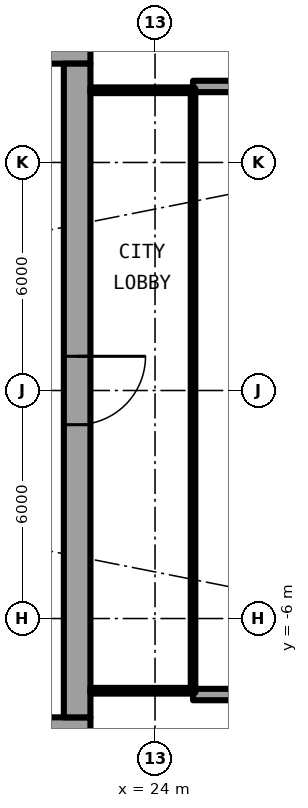
"""IFC4 building model, lengths in metres.
Left out: names, types, materials, properties, quantities, classifications, styles, units other than length and angle.
Written with IfcOpenShell. Run it as: python <this file> out.ifc"""

import sys

from ifc_helpers import new_model, si_unit, direction, frame, frame_2d, origin, place, context, subcontext, project, spatial, rectangle, extrude, element, fill, save


model = new_model("IFC4")
c1 = context("Model", 3, precision=1e-05, world=origin(), true_north=direction((0.0, 1.0)))
c2 = subcontext(c1, "Body", "Model", "MODEL_VIEW")
j1 = project(units=[si_unit("LENGTHUNIT", "METRE"), si_unit("PLANEANGLEUNIT", "RADIAN")], contexts=[c1])
p1 = place(None, origin())
s1 = spatial("IfcSite", under=j1, at=p1, CompositionType="ELEMENT")
p2 = place(p1, origin())
s2 = spatial("IfcBuilding", under=s1, at=p2, CompositionType="ELEMENT")
p3 = place(p2, frame((0.0, 0.0, 91.05)))
s3 = spatial("IfcBuildingStorey", under=s2, at=p3, CompositionType="ELEMENT", Elevation=91.05)
for number, where, z_axis, x_axis in (
    (1, (25.0, 8.0, 0.0), (0.0, 0.0, 1.0), (1.0, 0.0, 0.0)),
    (2, (25.0, -8.0, 0.0), (0.0, 0.0, 1.0), (1.0, 0.0, 0.0)),
):
    element("IfcWall", number, at=place(p3, frame(where, z_axis=z_axis, x_axis=x_axis)), inside=s3, PredefinedType="SOLIDWALL", context=c2, shape_type="SweptSolid", body=[
        extrude(rectangle(XDim=2.667, YDim=0.3, at=frame_2d((1.333, 0.0))), origin(), (0.0, 0.0, 1.0), 2.7),
    ])
p4 = place(p3, frame((22.3, 8.95, 0.0), z_axis=(0.0, 0.0, 1.0), x_axis=(-1.0, 0.0, 0.0)))
e3 = element("IfcWall", 3, at=p4, inside=s3, PredefinedType="SHEAR", context=c2, shape_type="SweptSolid", body=[
    extrude(rectangle(XDim=14.0, YDim=0.7, at=frame_2d((7.0, 0.0))), origin(), (0.0, 0.0, 1.0), 3.05),
])
p5 = place(p4, frame((1.225, 0.0, 0.0)))
e4 = element("IfcOpeningElement", 4, at=p5, cuts=e3, PredefinedType="OPENING", context=c2, shape_type="SweptSolid", body=[
    extrude(rectangle(XDim=1.2, YDim=2.3, at=frame_2d((0.6, 1.15))), frame((0.0, 0.36, 0.0), z_axis=(0.0, -1.0, 0.0), x_axis=(1.0, 0.0, 0.0)), (0.0, 0.0, 1.0), 0.72),
])
p6 = place(p3, frame((8.3, -8.95, 0.0), z_axis=(0.0, 0.0, 1.0), x_axis=(1.0, 0.0, 0.0)))
e5 = element("IfcWall", 5, at=p6, inside=s3, PredefinedType="SHEAR", context=c2, shape_type="SweptSolid", body=[
    extrude(rectangle(XDim=14.0, YDim=0.7, at=frame_2d((7.0, 0.0))), origin(), (0.0, 0.0, 1.0), 3.05),
])
p7 = place(p6, frame((11.575, 0.0, 0.0)))
e6 = element("IfcOpeningElement", 6, at=p7, cuts=e5, PredefinedType="OPENING", context=c2, shape_type="SweptSolid", body=[
    extrude(rectangle(XDim=1.2, YDim=2.3, at=frame_2d((0.6, 1.15))), frame((0.0, 0.36, 0.0), z_axis=(0.0, -1.0, 0.0), x_axis=(1.0, 0.0, 0.0)), (0.0, 0.0, 1.0), 0.72),
])
p8 = place(p3, frame((21.95, 8.6, 0.0), z_axis=(0.0, 0.0, 1.0), x_axis=(0.0, -1.0, 0.0)))
e7 = element("IfcWall", 7, at=p8, inside=s3, PredefinedType="SHEAR", context=c2, shape_type="SweptSolid", body=[
    extrude(rectangle(XDim=17.2, YDim=0.7, at=frame_2d((8.6, 0.0))), origin(), (0.0, 0.0, 1.0), 3.05),
])
p9 = place(p8, frame((7.7, 0.0, 0.0)))
e8 = element("IfcOpeningElement", 8, at=p9, cuts=e7, PredefinedType="OPENING", context=c2, shape_type="SweptSolid", body=[
    extrude(rectangle(XDim=1.8, YDim=2.3, at=frame_2d((0.9, 1.15))), frame((0.0, 0.36, 0.0), z_axis=(0.0, -1.0, 0.0), x_axis=(1.0, 0.0, 0.0)), (0.0, 0.0, 1.0), 0.72),
])
for number, where, z_axis, x_axis in (
    (9, (22.3, -7.9, 0.0), (0.0, 0.0, 1.0), (1.0, 0.0, 0.0)),
    (10, (22.3, 7.9, 0.0), (0.0, 0.0, 1.0), (1.0, 0.0, 0.0)),
):
    element("IfcWall", number, at=place(p3, frame(where, z_axis=z_axis, x_axis=x_axis)), inside=s3, PredefinedType="PARTITIONING", context=c2, shape_type="SweptSolid", body=[
        extrude(rectangle(XDim=2.64, YDim=0.15, at=frame_2d((1.32, 0.0))), origin(), (0.0, 0.0, 1.0), 2.7),
    ])
p10 = place(p3, frame((25.0, -7.95, 0.0), z_axis=(0.0, 0.0, 1.0), x_axis=(0.0, 1.0, 0.0)))
e11 = element("IfcWall", 11, at=p10, inside=s3, PredefinedType="PARTITIONING", context=c2, shape_type="SweptSolid", body=[
    extrude(rectangle(XDim=15.9, YDim=0.12, at=frame_2d((7.95, 0.0))), origin(), (0.0, 0.0, 1.0), 2.7),
])
p11 = place(p10, frame((0.95, 0.0, 0.1)))
e12 = element("IfcOpeningElement", 12, at=p11, cuts=e11, PredefinedType="OPENING", context=c2, shape_type="SweptSolid", body=[
    extrude(rectangle(XDim=14.0, YDim=2.35, at=frame_2d((7.0, 1.175))), frame((0.0, 0.07, 0.0), z_axis=(0.0, -1.0, 0.0), x_axis=(1.0, 0.0, 0.0)), (0.0, 0.0, 1.0), 0.14),
])
p12 = place(p9, origin())
e13 = element("IfcDoor", 13, at=p12, inside=s3, OperationType="SINGLE_SWING_LEFT", PredefinedType="DOOR", context=c2, shape_type="SweptSolid", body=[
    extrude(rectangle(XDim=1.8, YDim=2.3, at=frame_2d((0.9, 1.15))), frame((0.0, 0.025, 0.0), z_axis=(0.0, -1.0, 0.0), x_axis=(1.0, 0.0, 0.0)), (0.0, 0.0, 1.0), 0.05),
])
fill(e8, e13)
p13 = place(p11, origin())
e14 = element("IfcWindow", 14, at=p13, inside=s3, PartitioningType="SINGLE_PANEL", PredefinedType="WINDOW", context=c2, shape_type="SweptSolid", body=[
    extrude(rectangle(XDim=14.0, YDim=2.35, at=frame_2d((7.0, 1.175))), frame((0.0, 0.03, 0.0), z_axis=(0.0, -1.0, 0.0), x_axis=(1.0, 0.0, 0.0)), (0.0, 0.0, 1.0), 0.06),
])
fill(e12, e14)
save(model, sys.argv[1])
